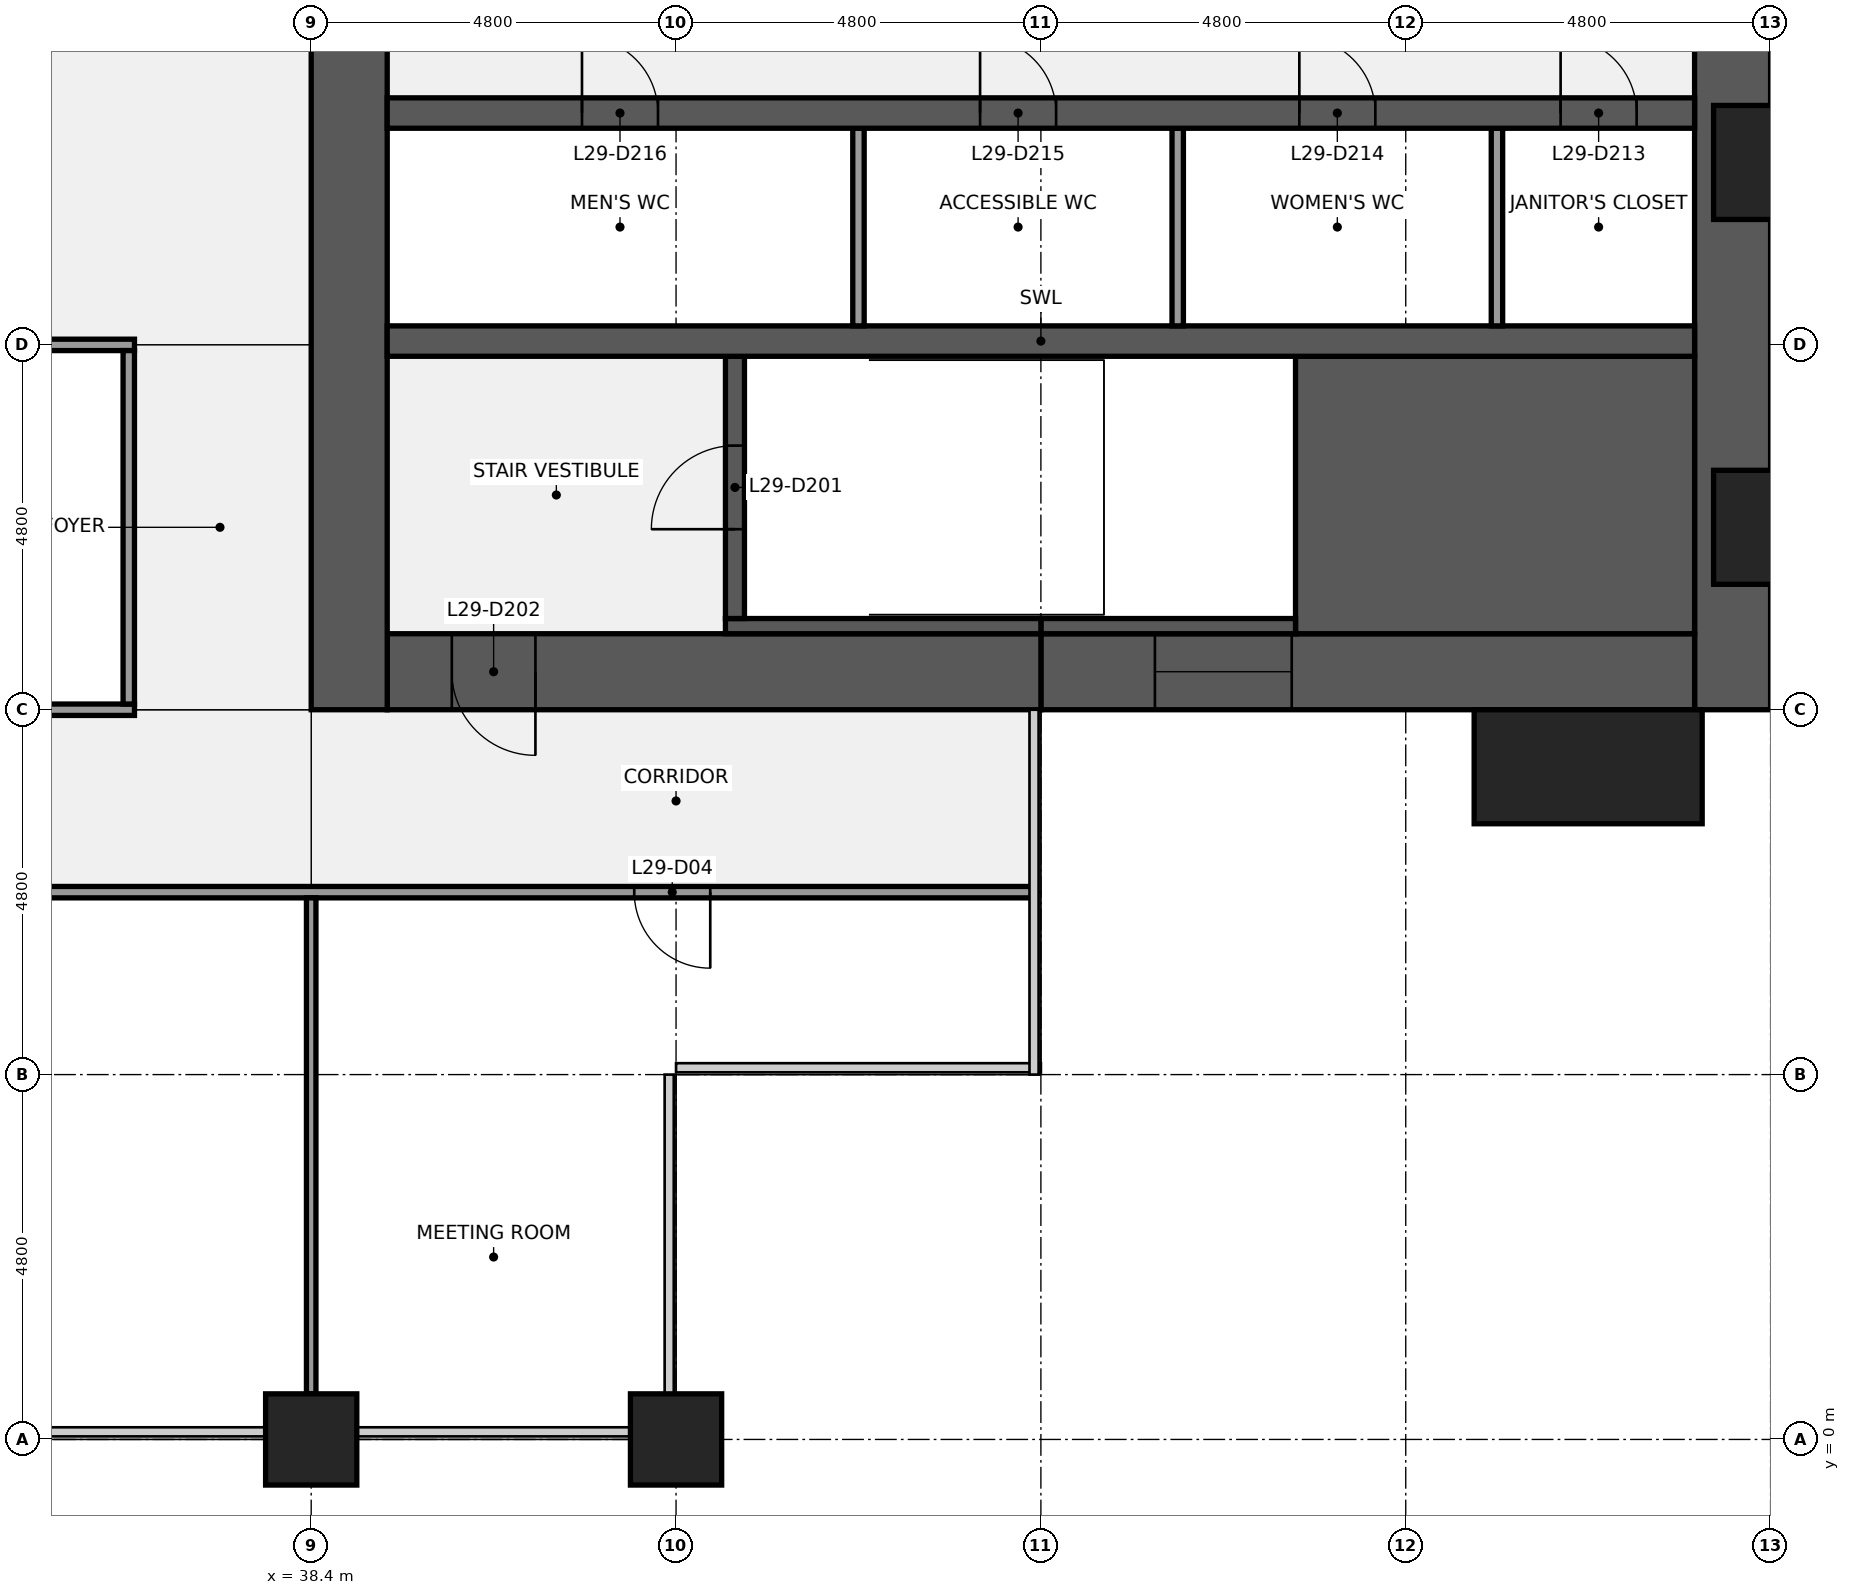
"""IFC4 building model, lengths in metres.
Left out: names, types, materials, properties, quantities, classifications, styles, units other than length and angle.
Written with IfcOpenShell. Run it as: python <this file> out.ifc"""

import sys

from ifc_helpers import new_model, si_unit, direction, frame, frame_2d, origin, origin_2d, place, context, subcontext, project, spatial, rectangle, extrude, element, fill, save


model = new_model("IFC4")
c1 = context("Model", 3, precision=1e-05, world=origin(), true_north=direction((0.0, 1.0)))
c2 = subcontext(c1, "Body", "Model", "MODEL_VIEW")
j1 = project(units=[si_unit("LENGTHUNIT", "METRE"), si_unit("PLANEANGLEUNIT", "RADIAN")], contexts=[c1])
p1 = place(None, origin())
s1 = spatial("IfcSite", under=j1, at=p1, CompositionType="ELEMENT")
p2 = place(p1, origin())
s2 = spatial("IfcBuilding", under=s1, at=p2, CompositionType="ELEMENT")
p3 = place(p2, frame((0.0, 0.0, 136.1)))
s3 = spatial("IfcBuildingStorey", under=s2, at=p3, CompositionType="ELEMENT", Elevation=136.1)
for number, where, z_axis, x_axis in (
    (1, (38.4, 0.0, 0.0), (0.0, 0.0, 1.0), (1.0, 0.0, 0.0)),
    (2, (43.2, 0.0, 0.0), (0.0, 0.0, 1.0), (1.0, 0.0, 0.0)),
):
    element("IfcColumn", number, at=place(p3, frame(where, z_axis=z_axis, x_axis=x_axis)), inside=s3, PredefinedType="COLUMN", context=c2, shape_type="SweptSolid", body=[
        extrude(rectangle(XDim=1.2, YDim=1.2, at=origin_2d()), origin(), (0.0, 0.0, 1.0), 4.0),
    ])
p4 = place(p3, frame((57.1, 38.4, 0.0), z_axis=(0.0, 0.0, 1.0), x_axis=(0.0, -1.0, 0.0)))
e3 = element("IfcWall", 3, at=p4, inside=s3, PredefinedType="SHEAR", context=c2, shape_type="SweptSolid", body=[
    extrude(rectangle(XDim=28.8, YDim=1.0, at=frame_2d((14.4, 0.0))), origin(), (0.0, 0.0, 1.0), 3.84),
])
p5 = place(p4, frame((18.45, 0.0, 0.9)))
e4 = element("IfcOpeningElement", 4, at=p5, cuts=e3, PredefinedType="OPENING", context=c2, shape_type="SweptSolid", body=[
    extrude(rectangle(XDim=1.5, YDim=1.5, at=frame_2d((0.75, 0.75))), frame((0.0, 0.51, 0.0), z_axis=(0.0, -1.0, 0.0), x_axis=(1.0, 0.0, 0.0)), (0.0, 0.0, 1.0), 1.02),
])
p6 = place(p4, frame((8.85, 0.0, 0.9)))
e5 = element("IfcOpeningElement", 5, at=p6, cuts=e3, PredefinedType="OPENING", context=c2, shape_type="SweptSolid", body=[
    extrude(rectangle(XDim=1.5, YDim=1.5, at=frame_2d((0.75, 0.75))), frame((0.0, 0.51, 0.0), z_axis=(0.0, -1.0, 0.0), x_axis=(1.0, 0.0, 0.0)), (0.0, 0.0, 1.0), 1.02),
])
p7 = place(p3, frame((56.6, 10.1, 0.0), z_axis=(0.0, 0.0, 1.0), x_axis=(-1.0, 0.0, 0.0)))
e6 = element("IfcWall", 6, at=p7, inside=s3, PredefinedType="SHEAR", context=c2, shape_type="SweptSolid", body=[
    extrude(rectangle(XDim=8.6, YDim=1.0, at=frame_2d((4.3, 0.0))), origin(), (0.0, 0.0, 1.0), 3.84),
])
p8 = place(p7, frame((5.3, 0.0, 0.9)))
e7 = element("IfcOpeningElement", 7, at=p8, cuts=e6, PredefinedType="OPENING", context=c2, shape_type="SweptSolid", body=[
    extrude(rectangle(XDim=1.8, YDim=1.5, at=frame_2d((0.9, 0.75))), frame((0.0, 0.51, 0.0), z_axis=(0.0, -1.0, 0.0), x_axis=(1.0, 0.0, 0.0)), (0.0, 0.0, 1.0), 1.02),
])
p9 = place(p3, frame((48.0, 10.1, 0.0), z_axis=(0.0, 0.0, 1.0), x_axis=(-1.0, 0.0, 0.0)))
e8 = element("IfcWall", 8, at=p9, inside=s3, PredefinedType="SHEAR", context=c2, shape_type="SweptSolid", body=[
    extrude(rectangle(XDim=8.6, YDim=1.0, at=frame_2d((4.3, 0.0))), origin(), (0.0, 0.0, 1.0), 3.84),
])
p10 = place(p9, frame((6.65, 0.0, 0.0)))
e9 = element("IfcOpeningElement", 9, at=p10, cuts=e8, PredefinedType="OPENING", context=c2, shape_type="SweptSolid", body=[
    extrude(rectangle(XDim=1.1, YDim=2.1, at=frame_2d((0.55, 1.05))), frame((0.0, 0.51, 0.0), z_axis=(0.0, -1.0, 0.0), x_axis=(1.0, 0.0, 0.0)), (0.0, 0.0, 1.0), 1.02),
])
p11 = place(p3, frame((38.9, 9.6, 0.0), z_axis=(0.0, 0.0, 1.0), x_axis=(0.0, 1.0, 0.0)))
e10 = element("IfcWall", 10, at=p11, inside=s3, PredefinedType="SHEAR", context=c2, shape_type="SweptSolid", body=[
    extrude(rectangle(XDim=28.8, YDim=1.0, at=frame_2d((14.4, 0.0))), origin(), (0.0, 0.0, 1.0), 3.84),
])
p12 = place(p11, frame((8.7, 0.0, 0.0)))
e11 = element("IfcOpeningElement", 11, at=p12, cuts=e10, PredefinedType="OPENING", context=c2, shape_type="SweptSolid", body=[
    extrude(rectangle(XDim=1.8, YDim=2.1, at=frame_2d((0.9, 1.05))), frame((0.0, 0.51, 0.0), z_axis=(0.0, -1.0, 0.0), x_axis=(1.0, 0.0, 0.0)), (0.0, 0.0, 1.0), 1.02),
])
p13 = place(p11, frame((18.3, 0.0, 0.0)))
e12 = element("IfcOpeningElement", 12, at=p13, cuts=e10, PredefinedType="OPENING", context=c2, shape_type="SweptSolid", body=[
    extrude(rectangle(XDim=1.8, YDim=2.1, at=frame_2d((0.9, 1.05))), frame((0.0, 0.51, 0.0), z_axis=(0.0, -1.0, 0.0), x_axis=(1.0, 0.0, 0.0)), (0.0, 0.0, 1.0), 1.02),
])
p14 = place(p3, frame((51.35, 12.425, 0.0), z_axis=(0.0, 0.0, 1.0), x_axis=(1.0, 0.0, 0.0)))
e13 = element("IfcWall", 13, at=p14, inside=s3, PredefinedType="SHEAR", context=c2, shape_type="SweptSolid", body=[
    extrude(rectangle(XDim=5.25, YDim=3.65, at=frame_2d((2.625, 0.0))), origin(), (0.0, 0.0, 1.0), 3.84),
])
p15 = place(p3, frame((48.0, 10.7, 0.0), z_axis=(0.0, 0.0, 1.0), x_axis=(1.0, 0.0, 0.0)))
e14 = element("IfcWall", 14, at=p15, inside=s3, PredefinedType="SHEAR", context=c2, shape_type="SweptSolid", body=[
    extrude(rectangle(XDim=3.35, YDim=0.2, at=frame_2d((1.675, 0.0))), origin(), (0.0, 0.0, 1.0), 3.84),
])
p16 = place(p3, frame((43.85, 10.7, 0.0), z_axis=(0.0, 0.0, 1.0), x_axis=(1.0, 0.0, 0.0)))
e15 = element("IfcWall", 15, at=p16, inside=s3, PredefinedType="SHEAR", context=c2, shape_type="SweptSolid", body=[
    extrude(rectangle(XDim=4.15, YDim=0.2, at=frame_2d((2.075, 0.0))), origin(), (0.0, 0.0, 1.0), 3.84),
])
p17 = place(p3, frame((43.975, 10.8, 0.0), z_axis=(0.0, 0.0, 1.0), x_axis=(0.0, 1.0, 0.0)))
e16 = element("IfcWall", 16, at=p17, inside=s3, PredefinedType="SHEAR", context=c2, shape_type="SweptSolid", body=[
    extrude(rectangle(XDim=3.45, YDim=0.25, at=frame_2d((1.725, 0.0))), origin(), (0.0, 0.0, 1.0), 3.84),
])
p18 = place(p17, frame((1.175, 0.0, 0.0)))
e17 = element("IfcOpeningElement", 17, at=p18, cuts=e16, PredefinedType="OPENING", context=c2, shape_type="SweptSolid", body=[
    extrude(rectangle(XDim=1.1, YDim=2.1, at=frame_2d((0.55, 1.05))), frame((0.0, 0.135, 0.0), z_axis=(0.0, -1.0, 0.0), x_axis=(1.0, 0.0, 0.0)), (0.0, 0.0, 1.0), 0.27),
])
p19 = place(p3, frame((39.4, 14.45, 0.0), z_axis=(0.0, 0.0, 1.0), x_axis=(1.0, 0.0, 0.0)))
e18 = element("IfcWall", 18, at=p19, inside=s3, PredefinedType="SHEAR", context=c2, shape_type="SweptSolid", body=[
    extrude(rectangle(XDim=17.2, YDim=0.4, at=frame_2d((8.6, 0.0))), origin(), (0.0, 0.0, 1.0), 3.84),
])
for number, where, z_axis, x_axis in (
    (19, (54.0, 14.65, 0.0), (0.0, 0.0, 1.0), (0.0, 1.0, 0.0)),
    (20, (49.8, 14.65, 0.0), (0.0, 0.0, 1.0), (0.0, 1.0, 0.0)),
    (21, (45.6, 14.65, 0.0), (0.0, 0.0, 1.0), (0.0, 1.0, 0.0)),
):
    element("IfcWall", number, at=place(p3, frame(where, z_axis=z_axis, x_axis=x_axis)), inside=s3, PredefinedType="PARTITIONING", context=c2, shape_type="SweptSolid", body=[
        extrude(rectangle(XDim=2.6, YDim=0.15, at=frame_2d((1.3, 0.0))), origin(), (0.0, 0.0, 1.0), 3.84),
    ])
p20 = place(p3, frame((39.4, 17.45, 0.0), z_axis=(0.0, 0.0, 1.0), x_axis=(1.0, 0.0, 0.0)))
e22 = element("IfcWall", 22, at=p20, inside=s3, PredefinedType="SHEAR", context=c2, shape_type="SweptSolid", body=[
    extrude(rectangle(XDim=17.2, YDim=0.4, at=frame_2d((8.6, 0.0))), origin(), (0.0, 0.0, 1.0), 3.84),
])
p21 = place(p20, frame((15.438, 0.0, 0.0)))
e23 = element("IfcOpeningElement", 23, at=p21, cuts=e22, PredefinedType="OPENING", context=c2, shape_type="SweptSolid", body=[
    extrude(rectangle(XDim=1.0, YDim=2.1, at=frame_2d((0.5, 1.05))), frame((0.0, 0.21, 0.0), z_axis=(0.0, -1.0, 0.0), x_axis=(1.0, 0.0, 0.0)), (0.0, 0.0, 1.0), 0.42),
])
p22 = place(p20, frame((12.0, 0.0, 0.0)))
e24 = element("IfcOpeningElement", 24, at=p22, cuts=e22, PredefinedType="OPENING", context=c2, shape_type="SweptSolid", body=[
    extrude(rectangle(XDim=1.0, YDim=2.1, at=frame_2d((0.5, 1.05))), frame((0.0, 0.21, 0.0), z_axis=(0.0, -1.0, 0.0), x_axis=(1.0, 0.0, 0.0)), (0.0, 0.0, 1.0), 0.42),
])
p23 = place(p20, frame((7.8, 0.0, 0.0)))
e25 = element("IfcOpeningElement", 25, at=p23, cuts=e22, PredefinedType="OPENING", context=c2, shape_type="SweptSolid", body=[
    extrude(rectangle(XDim=1.0, YDim=2.1, at=frame_2d((0.5, 1.05))), frame((0.0, 0.21, 0.0), z_axis=(0.0, -1.0, 0.0), x_axis=(1.0, 0.0, 0.0)), (0.0, 0.0, 1.0), 0.42),
])
p24 = place(p20, frame((2.562, 0.0, 0.0)))
e26 = element("IfcOpeningElement", 26, at=p24, cuts=e22, PredefinedType="OPENING", context=c2, shape_type="SweptSolid", body=[
    extrude(rectangle(XDim=1.0, YDim=2.1, at=frame_2d((0.5, 1.05))), frame((0.0, 0.21, 0.0), z_axis=(0.0, -1.0, 0.0), x_axis=(1.0, 0.0, 0.0)), (0.0, 0.0, 1.0), 0.42),
])
p25 = place(p3, frame((9.7, 7.2, 0.0), z_axis=(0.0, 0.0, 1.0), x_axis=(1.0, 0.0, 0.0)))
e27 = element("IfcWall", 27, at=p25, inside=s3, PredefinedType="PARTITIONING", context=c2, shape_type="SweptSolid", body=[
    extrude(rectangle(XDim=38.2, YDim=0.15, at=frame_2d((19.1, 0.0))), origin(), (0.0, 0.0, 1.0), 2.849),
])
p26 = place(p25, frame((0.65, 0.0, 0.0)))
e28 = element("IfcOpeningElement", 28, at=p26, cuts=e27, PredefinedType="OPENING", context=c2, shape_type="SweptSolid", body=[
    extrude(rectangle(XDim=1.0, YDim=2.1, at=frame_2d((0.5, 1.05))), frame((0.0, 0.085, 0.0), z_axis=(0.0, -1.0, 0.0), x_axis=(1.0, 0.0, 0.0)), (0.0, 0.0, 1.0), 0.17),
])
p27 = place(p25, frame((13.8, 0.0, 0.0)))
e29 = element("IfcOpeningElement", 29, at=p27, cuts=e27, PredefinedType="OPENING", context=c2, shape_type="SweptSolid", body=[
    extrude(rectangle(XDim=1.0, YDim=2.1, at=frame_2d((0.5, 1.05))), frame((0.0, 0.085, 0.0), z_axis=(0.0, -1.0, 0.0), x_axis=(1.0, 0.0, 0.0)), (0.0, 0.0, 1.0), 0.17),
])
p28 = place(p25, frame((23.4, 0.0, 0.0)))
e30 = element("IfcOpeningElement", 30, at=p28, cuts=e27, PredefinedType="OPENING", context=c2, shape_type="SweptSolid", body=[
    extrude(rectangle(XDim=1.0, YDim=2.1, at=frame_2d((0.5, 1.05))), frame((0.0, 0.085, 0.0), z_axis=(0.0, -1.0, 0.0), x_axis=(1.0, 0.0, 0.0)), (0.0, 0.0, 1.0), 0.17),
])
p29 = place(p25, frame((32.95, 0.0, 0.0)))
e31 = element("IfcOpeningElement", 31, at=p29, cuts=e27, PredefinedType="OPENING", context=c2, shape_type="SweptSolid", body=[
    extrude(rectangle(XDim=1.0, YDim=2.1, at=frame_2d((0.5, 1.05))), frame((0.0, 0.085, 0.0), z_axis=(0.0, -1.0, 0.0), x_axis=(1.0, 0.0, 0.0)), (0.0, 0.0, 1.0), 0.17),
])
p30 = place(p3, frame((21.525, 9.6, 0.0), z_axis=(0.0, 0.0, 1.0), x_axis=(1.0, 0.0, 0.0)))
e32 = element("IfcWall", 32, at=p30, inside=s3, PredefinedType="PARTITIONING", context=c2, shape_type="SweptSolid", body=[
    extrude(rectangle(XDim=14.55, YDim=0.15, at=frame_2d((7.275, 0.0))), origin(), (0.0, 0.0, 1.0), 2.849),
])
p31 = place(p30, frame((3.175, 0.0, 0.0)))
e33 = element("IfcOpeningElement", 33, at=p31, cuts=e32, PredefinedType="OPENING", context=c2, shape_type="SweptSolid", body=[
    extrude(rectangle(XDim=1.0, YDim=2.1, at=frame_2d((0.5, 1.05))), frame((0.0, 0.085, 0.0), z_axis=(0.0, -1.0, 0.0), x_axis=(1.0, 0.0, 0.0)), (0.0, 0.0, 1.0), 0.17),
])
p32 = place(p30, frame((10.375, 0.0, 0.0)))
e34 = element("IfcOpeningElement", 34, at=p32, cuts=e32, PredefinedType="OPENING", context=c2, shape_type="SweptSolid", body=[
    extrude(rectangle(XDim=1.0, YDim=2.1, at=frame_2d((0.5, 1.05))), frame((0.0, 0.085, 0.0), z_axis=(0.0, -1.0, 0.0), x_axis=(1.0, 0.0, 0.0)), (0.0, 0.0, 1.0), 0.17),
])
p33 = place(p3, frame((33.675, 14.4, 0.0), z_axis=(0.0, 0.0, 1.0), x_axis=(1.0, 0.0, 0.0)))
e35 = element("IfcWall", 35, at=p33, inside=s3, PredefinedType="PARTITIONING", context=c2, shape_type="SweptSolid", body=[
    extrude(rectangle(XDim=2.4, YDim=0.15, at=frame_2d((1.2, 0.0))), origin(), (0.0, 0.0, 1.0), 2.849),
])
p34 = place(p3, frame((36.0, 9.675, 0.0), z_axis=(0.0, 0.0, 1.0), x_axis=(0.0, 1.0, 0.0)))
e36 = element("IfcWall", 36, at=p34, inside=s3, PredefinedType="PARTITIONING", context=c2, shape_type="SweptSolid", body=[
    extrude(rectangle(XDim=4.65, YDim=0.15, at=frame_2d((2.325, 0.0))), origin(), (0.0, 0.0, 1.0), 2.849),
])
p35 = place(p3, frame((38.4, 0.6, 0.0), z_axis=(0.0, 0.0, 1.0), x_axis=(0.0, 1.0, 0.0)))
e37 = element("IfcWall", 37, at=p35, inside=s3, PredefinedType="PARTITIONING", context=c2, shape_type="SweptSolid", body=[
    extrude(rectangle(XDim=6.525, YDim=0.125, at=frame_2d((3.262, 0.0))), origin(), (0.0, 0.0, 1.0), 2.849),
])
p36 = place(p3, frame((55.2, 8.85, 0.0), z_axis=(0.0, 0.0, 1.0), x_axis=(1.0, 0.0, 0.0)))
e38 = element("IfcColumn", 38, at=p36, inside=s3, PredefinedType="PILASTER", context=c2, shape_type="SweptSolid", body=[
    extrude(rectangle(XDim=3.0, YDim=1.5, at=origin_2d()), origin(), (0.0, 0.0, 1.0), 4.0),
])
for number, where, z_axis, x_axis in (
    (39, (38.4, -1.05, 0.0), (0.0, 0.0, 1.0), (1.0, 0.0, 0.0)),
    (40, (43.2, -1.05, 0.0), (0.0, 0.0, 1.0), (1.0, 0.0, 0.0)),
):
    element("IfcColumn", number, at=place(p3, frame(where, z_axis=z_axis, x_axis=x_axis)), inside=s3, PredefinedType="PILASTER", context=c2, shape_type="SweptSolid", body=[
        extrude(rectangle(XDim=3.6, YDim=0.9, at=origin_2d()), origin(), (0.0, 0.0, 1.0), 4.0),
    ])
p37 = place(p18, origin())
e41 = element("IfcDoor", 41, at=p37, inside=s3, OperationType="SINGLE_SWING_LEFT", PredefinedType="DOOR", context=c2, shape_type="SweptSolid", body=[
    extrude(rectangle(XDim=1.1, YDim=2.1, at=frame_2d((0.55, 1.05))), frame((0.0, 0.025, 0.0), z_axis=(0.0, -1.0, 0.0), x_axis=(1.0, 0.0, 0.0)), (0.0, 0.0, 1.0), 0.05),
])
fill(e17, e41)
p38 = place(p10, origin())
e42 = element("IfcDoor", 42, at=p38, inside=s3, OperationType="SINGLE_SWING_LEFT", PredefinedType="DOOR", context=c2, shape_type="SweptSolid", body=[
    extrude(rectangle(XDim=1.1, YDim=2.1, at=frame_2d((0.55, 1.05))), frame((0.0, 0.025, 0.0), z_axis=(0.0, -1.0, 0.0), x_axis=(1.0, 0.0, 0.0)), (0.0, 0.0, 1.0), 0.05),
])
fill(e9, e42)
p39 = place(p21, origin())
e43 = element("IfcDoor", 43, at=p39, inside=s3, OperationType="SINGLE_SWING_LEFT", PredefinedType="DOOR", context=c2, shape_type="SweptSolid", body=[
    extrude(rectangle(XDim=1.0, YDim=2.1, at=frame_2d((0.5, 1.05))), frame((0.0, 0.025, 0.0), z_axis=(0.0, -1.0, 0.0), x_axis=(1.0, 0.0, 0.0)), (0.0, 0.0, 1.0), 0.05),
])
fill(e23, e43)
p40 = place(p22, origin())
e44 = element("IfcDoor", 44, at=p40, inside=s3, OperationType="SINGLE_SWING_LEFT", PredefinedType="DOOR", context=c2, shape_type="SweptSolid", body=[
    extrude(rectangle(XDim=1.0, YDim=2.1, at=frame_2d((0.5, 1.05))), frame((0.0, 0.025, 0.0), z_axis=(0.0, -1.0, 0.0), x_axis=(1.0, 0.0, 0.0)), (0.0, 0.0, 1.0), 0.05),
])
fill(e24, e44)
p41 = place(p23, origin())
e45 = element("IfcDoor", 45, at=p41, inside=s3, OperationType="SINGLE_SWING_LEFT", PredefinedType="DOOR", context=c2, shape_type="SweptSolid", body=[
    extrude(rectangle(XDim=1.0, YDim=2.1, at=frame_2d((0.5, 1.05))), frame((0.0, 0.025, 0.0), z_axis=(0.0, -1.0, 0.0), x_axis=(1.0, 0.0, 0.0)), (0.0, 0.0, 1.0), 0.05),
])
fill(e25, e45)
p42 = place(p24, origin())
e46 = element("IfcDoor", 46, at=p42, inside=s3, OperationType="SINGLE_SWING_LEFT", PredefinedType="DOOR", context=c2, shape_type="SweptSolid", body=[
    extrude(rectangle(XDim=1.0, YDim=2.1, at=frame_2d((0.5, 1.05))), frame((0.0, 0.025, 0.0), z_axis=(0.0, -1.0, 0.0), x_axis=(1.0, 0.0, 0.0)), (0.0, 0.0, 1.0), 0.05),
])
fill(e26, e46)
p43 = place(p8, origin())
e47 = element("IfcWindow", 47, at=p43, inside=s3, PartitioningType="SINGLE_PANEL", PredefinedType="WINDOW", context=c2, shape_type="SweptSolid", body=[
    extrude(rectangle(XDim=1.8, YDim=1.5, at=frame_2d((0.9, 0.75))), frame((0.0, 0.03, 0.0), z_axis=(0.0, -1.0, 0.0), x_axis=(1.0, 0.0, 0.0)), (0.0, 0.0, 1.0), 0.06),
])
fill(e7, e47)
p44 = place(p29, origin())
e48 = element("IfcDoor", 48, at=p44, inside=s3, OperationType="SINGLE_SWING_RIGHT", PredefinedType="DOOR", context=c2, shape_type="SweptSolid", body=[
    extrude(rectangle(XDim=1.0, YDim=2.1, at=frame_2d((0.5, 1.05))), frame((0.0, 0.025, 0.0), z_axis=(0.0, -1.0, 0.0), x_axis=(1.0, 0.0, 0.0)), (0.0, 0.0, 1.0), 0.05),
])
fill(e31, e48)
save(model, sys.argv[1])
